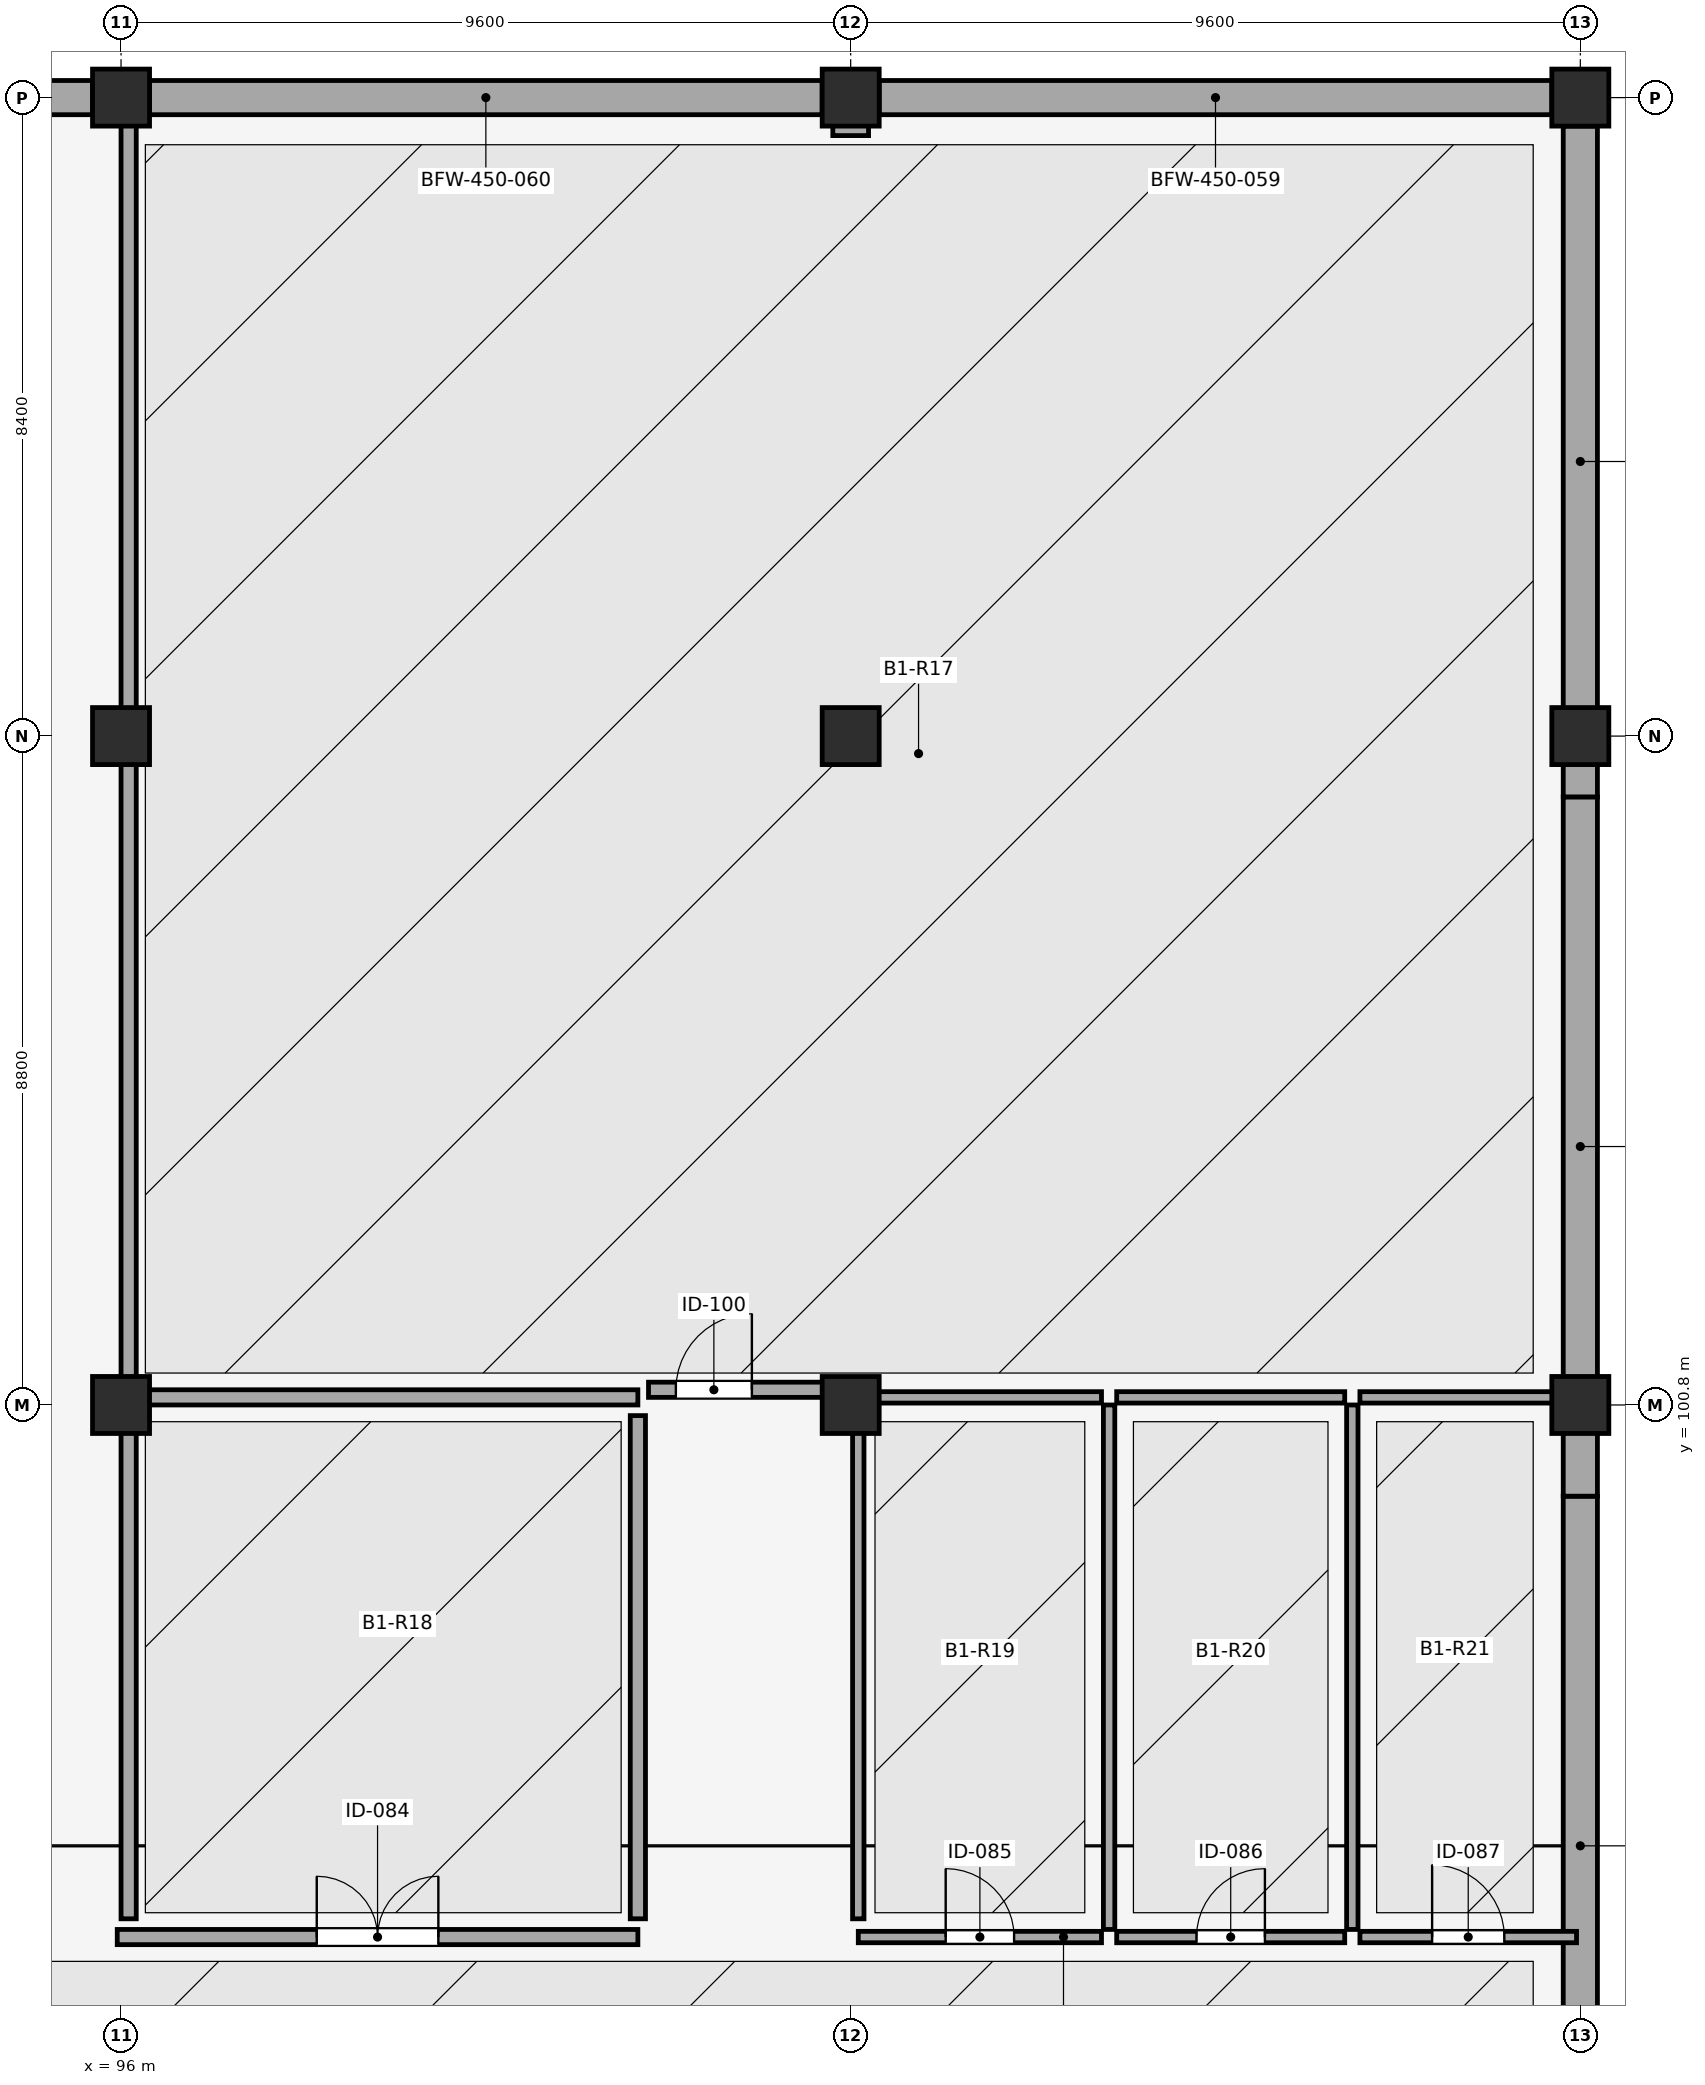
"""IFC4 building model, lengths in metres.
Left out: names, types, materials, properties, quantities, classifications, styles, units other than length and angle.
Written with IfcOpenShell. Run it as: python <this file> out.ifc"""

import sys

from ifc_helpers import new_model, si_unit, direction, frame, frame_2d, origin, origin_2d, place, context, subcontext, project, spatial, rectangle, extrude, element, fill, save


model = new_model("IFC4")
c1 = context("Model", 3, precision=1e-05, world=origin(), true_north=direction((0.0, 1.0)))
c2 = subcontext(c1, "Body", "Model", "MODEL_VIEW")
j1 = project(units=[si_unit("LENGTHUNIT", "METRE"), si_unit("PLANEANGLEUNIT", "RADIAN")], contexts=[c1])
p1 = place(None, origin())
s1 = spatial("IfcSite", under=j1, at=p1, CompositionType="ELEMENT")
p2 = place(p1, origin())
s2 = spatial("IfcBuilding", under=s1, at=p2, CompositionType="ELEMENT")
p3 = place(p2, frame((0.0, 0.0, -4.2)))
s3 = spatial("IfcBuildingStorey", under=s2, at=p3, CompositionType="ELEMENT", Elevation=-4.2)
for number, where, z_axis, x_axis in (
    (1, (96.0, 100.8, 0.0), (0.0, 0.0, 1.0), (1.0, 0.0, 0.0)),
    (2, (96.0, 109.6, 0.0), (0.0, 0.0, 1.0), (1.0, 0.0, 0.0)),
    (3, (96.0, 118.0, 0.0), (0.0, 0.0, 1.0), (1.0, 0.0, 0.0)),
    (4, (105.6, 100.8, 0.0), (0.0, 0.0, 1.0), (1.0, 0.0, 0.0)),
    (5, (105.6, 109.6, 0.0), (0.0, 0.0, 1.0), (1.0, 0.0, 0.0)),
    (6, (105.6, 118.0, 0.0), (0.0, 0.0, 1.0), (1.0, 0.0, 0.0)),
    (7, (115.2, 100.8, 0.0), (0.0, 0.0, 1.0), (1.0, 0.0, 0.0)),
    (8, (115.2, 109.6, 0.0), (0.0, 0.0, 1.0), (1.0, 0.0, 0.0)),
    (9, (115.2, 118.0, 0.0), (0.0, 0.0, 1.0), (1.0, 0.0, 0.0)),
):
    element("IfcColumn", number, at=place(p3, frame(where, z_axis=z_axis, x_axis=x_axis)), inside=s3, PredefinedType="COLUMN", context=c2, shape_type="SweptSolid", body=[
        extrude(rectangle(XDim=0.75, YDim=0.75, at=origin_2d()), origin(), (0.0, 0.0, 1.0), 4.2),
    ])
p4 = place(p3, frame((115.2, 90.4, 0.0), z_axis=(0.0, 0.0, 1.0), x_axis=(0.0, 1.0, 0.0)))
e10 = element("IfcWall", 10, at=p4, inside=s3, PredefinedType="SOLIDWALL", context=c2, shape_type="SweptSolid", body=[
    extrude(rectangle(XDim=9.2, YDim=0.45, at=frame_2d((4.6, 0.0))), origin(), (0.0, 0.0, 1.0), 3.84),
])
p5 = place(p3, frame((115.2, 99.6, 0.0), z_axis=(0.0, 0.0, 1.0), x_axis=(0.0, 1.0, 0.0)))
e11 = element("IfcWall", 11, at=p5, inside=s3, PredefinedType="SOLIDWALL", context=c2, shape_type="SweptSolid", body=[
    extrude(rectangle(XDim=9.2, YDim=0.45, at=frame_2d((4.6, 0.0))), origin(), (0.0, 0.0, 1.0), 3.84),
])
p6 = place(p3, frame((115.2, 108.8, 0.0), z_axis=(0.0, 0.0, 1.0), x_axis=(0.0, 1.0, 0.0)))
e12 = element("IfcWall", 12, at=p6, inside=s3, PredefinedType="SOLIDWALL", context=c2, shape_type="SweptSolid", body=[
    extrude(rectangle(XDim=8.825, YDim=0.45, at=frame_2d((4.413, 0.0))), origin(), (0.0, 0.0, 1.0), 3.84),
])
p7 = place(p3, frame((114.825, 118.0, 0.0), z_axis=(0.0, 0.0, 1.0), x_axis=(-1.0, 0.0, 0.0)))
e13 = element("IfcWall", 13, at=p7, inside=s3, PredefinedType="SOLIDWALL", context=c2, shape_type="SweptSolid", body=[
    extrude(rectangle(XDim=8.85, YDim=0.45, at=frame_2d((4.425, 0.0))), origin(), (0.0, 0.0, 1.0), 3.84),
])
for number, where, z_axis, x_axis in (
    (14, (105.225, 118.0, 0.0), (0.0, 0.0, 1.0), (-1.0, 0.0, 0.0)),
    (15, (95.625, 118.0, 0.0), (0.0, 0.0, 1.0), (-1.0, 0.0, 0.0)),
):
    element("IfcWall", number, at=place(p3, frame(where, z_axis=z_axis, x_axis=x_axis)), inside=s3, PredefinedType="SOLIDWALL", context=c2, shape_type="SweptSolid", body=[
        extrude(rectangle(XDim=8.85, YDim=0.45, at=frame_2d((4.425, 0.0))), origin(), (0.0, 0.0, 1.0), 3.84),
    ])
p8 = place(p3, frame((95.95, 93.8, 0.0), z_axis=(0.0, 0.0, 1.0), x_axis=(1.0, 0.0, 0.0)))
e16 = element("IfcWall", 16, at=p8, inside=s3, PredefinedType="PARTITIONING", context=c2, shape_type="SweptSolid", body=[
    extrude(rectangle(XDim=6.85, YDim=0.2, at=frame_2d((3.425, 0.0))), origin(), (0.0, 0.0, 1.0), 3.84),
])
p9 = place(p8, frame((2.625, 0.0, 0.0)))
e17 = element("IfcOpeningElement", 17, at=p9, cuts=e16, PredefinedType="OPENING", context=c2, shape_type="SweptSolid", body=[
    extrude(rectangle(XDim=1.6, YDim=2.2, at=frame_2d((0.8, 1.1))), frame((0.0, 0.11, 0.0), z_axis=(0.0, -1.0, 0.0), x_axis=(1.0, 0.0, 0.0)), (0.0, 0.0, 1.0), 0.22),
])
p10 = place(p3, frame((105.7, 93.8, 0.0), z_axis=(0.0, 0.0, 1.0), x_axis=(1.0, 0.0, 0.0)))
e18 = element("IfcWall", 18, at=p10, inside=s3, PredefinedType="PARTITIONING", context=c2, shape_type="SweptSolid", body=[
    extrude(rectangle(XDim=3.2, YDim=0.15, at=frame_2d((1.6, 0.0))), origin(), (0.0, 0.0, 1.0), 3.84),
])
p11 = place(p10, frame((1.15, 0.0, 0.0)))
e19 = element("IfcOpeningElement", 19, at=p11, cuts=e18, PredefinedType="OPENING", context=c2, shape_type="SweptSolid", body=[
    extrude(rectangle(XDim=0.9, YDim=2.15, at=frame_2d((0.45, 1.075))), frame((0.0, 0.085, 0.0), z_axis=(0.0, -1.0, 0.0), x_axis=(1.0, 0.0, 0.0)), (0.0, 0.0, 1.0), 0.17),
])
p12 = place(p3, frame((109.1, 93.8, 0.0), z_axis=(0.0, 0.0, 1.0), x_axis=(1.0, 0.0, 0.0)))
e20 = element("IfcWall", 20, at=p12, inside=s3, PredefinedType="PARTITIONING", context=c2, shape_type="SweptSolid", body=[
    extrude(rectangle(XDim=3.0, YDim=0.15, at=frame_2d((1.5, 0.0))), origin(), (0.0, 0.0, 1.0), 3.84),
])
p13 = place(p12, frame((1.05, 0.0, 0.0)))
e21 = element("IfcOpeningElement", 21, at=p13, cuts=e20, PredefinedType="OPENING", context=c2, shape_type="SweptSolid", body=[
    extrude(rectangle(XDim=0.9, YDim=2.15, at=frame_2d((0.45, 1.075))), frame((0.0, 0.085, 0.0), z_axis=(0.0, -1.0, 0.0), x_axis=(1.0, 0.0, 0.0)), (0.0, 0.0, 1.0), 0.17),
])
p14 = place(p3, frame((112.3, 93.8, 0.0), z_axis=(0.0, 0.0, 1.0), x_axis=(1.0, 0.0, 0.0)))
e22 = element("IfcWall", 22, at=p14, inside=s3, PredefinedType="PARTITIONING", context=c2, shape_type="SweptSolid", body=[
    extrude(rectangle(XDim=2.85, YDim=0.15, at=frame_2d((1.425, 0.0))), origin(), (0.0, 0.0, 1.0), 3.84),
])
p15 = place(p14, frame((0.95, 0.0, 0.0)))
e23 = element("IfcOpeningElement", 23, at=p15, cuts=e22, PredefinedType="OPENING", context=c2, shape_type="SweptSolid", body=[
    extrude(rectangle(XDim=0.95, YDim=2.15, at=frame_2d((0.475, 1.075))), frame((0.0, 0.085, 0.0), z_axis=(0.0, -1.0, 0.0), x_axis=(1.0, 0.0, 0.0)), (0.0, 0.0, 1.0), 0.17),
])
p16 = place(p3, frame((95.95, 100.9, 0.0), z_axis=(0.0, 0.0, 1.0), x_axis=(1.0, 0.0, 0.0)))
e24 = element("IfcWall", 24, at=p16, inside=s3, PredefinedType="PARTITIONING", context=c2, shape_type="SweptSolid", body=[
    extrude(rectangle(XDim=6.85, YDim=0.2, at=frame_2d((3.425, 0.0))), origin(), (0.0, 0.0, 1.0), 3.292),
])
p17 = place(p3, frame((105.7, 100.9, 0.0), z_axis=(0.0, 0.0, 1.0), x_axis=(1.0, 0.0, 0.0)))
e25 = element("IfcWall", 25, at=p17, inside=s3, PredefinedType="PARTITIONING", context=c2, shape_type="SweptSolid", body=[
    extrude(rectangle(XDim=3.2, YDim=0.15, at=frame_2d((1.6, 0.0))), origin(), (0.0, 0.0, 1.0), 3.292),
])
p18 = place(p3, frame((109.1, 100.9, 0.0), z_axis=(0.0, 0.0, 1.0), x_axis=(1.0, 0.0, 0.0)))
e26 = element("IfcWall", 26, at=p18, inside=s3, PredefinedType="PARTITIONING", context=c2, shape_type="SweptSolid", body=[
    extrude(rectangle(XDim=3.0, YDim=0.15, at=frame_2d((1.5, 0.0))), origin(), (0.0, 0.0, 1.0), 3.292),
])
p19 = place(p3, frame((112.3, 100.9, 0.0), z_axis=(0.0, 0.0, 1.0), x_axis=(1.0, 0.0, 0.0)))
e27 = element("IfcWall", 27, at=p19, inside=s3, PredefinedType="PARTITIONING", context=c2, shape_type="SweptSolid", body=[
    extrude(rectangle(XDim=2.85, YDim=0.15, at=frame_2d((1.425, 0.0))), origin(), (0.0, 0.0, 1.0), 3.292),
])
for number, where, z_axis, x_axis in (
    (28, (109.0, 93.9, 0.0), (0.0, 0.0, 1.0), (0.0, 1.0, 0.0)),
    (29, (112.2, 93.9, 0.0), (0.0, 0.0, 1.0), (0.0, 1.0, 0.0)),
):
    element("IfcWall", number, at=place(p3, frame(where, z_axis=z_axis, x_axis=x_axis)), inside=s3, PredefinedType="PARTITIONING", context=c2, shape_type="SweptSolid", body=[
        extrude(rectangle(XDim=6.9, YDim=0.15, at=frame_2d((3.45, 0.0))), origin(), (0.0, 0.0, 1.0), 3.84),
    ])
p20 = place(p3, frame((102.94, 101.0, 0.0), z_axis=(0.0, 0.0, 1.0), x_axis=(1.0, 0.0, 0.0)))
e30 = element("IfcWall", 30, at=p20, inside=s3, PredefinedType="PARTITIONING", context=c2, shape_type="SweptSolid", body=[
    extrude(rectangle(XDim=2.62, YDim=0.2, at=frame_2d((1.31, 0.0))), origin(), (0.0, 0.0, 1.0), 3.292),
])
p21 = place(p20, frame((0.36, 0.0, 0.0)))
e31 = element("IfcOpeningElement", 31, at=p21, cuts=e30, PredefinedType="OPENING", context=c2, shape_type="SweptSolid", body=[
    extrude(rectangle(XDim=1.0, YDim=2.15, at=frame_2d((0.5, 1.075))), frame((0.0, 0.11, 0.0), z_axis=(0.0, -1.0, 0.0), x_axis=(1.0, 0.0, 0.0)), (0.0, 0.0, 1.0), 0.22),
])
p22 = place(p3, frame((105.365, 117.6, 0.0), z_axis=(0.0, 0.0, 1.0), x_axis=(1.0, 0.0, 0.0)))
e32 = element("IfcWall", 32, at=p22, inside=s3, PredefinedType="PARTITIONING", context=c2, shape_type="SweptSolid", body=[
    extrude(rectangle(XDim=0.47, YDim=0.2, at=frame_2d((0.235, 0.0))), origin(), (0.0, 0.0, 1.0), 3.84),
])
p23 = place(p3, frame((96.1, 101.14, 0.0), z_axis=(0.0, 0.0, 1.0), x_axis=(0.0, 1.0, 0.0)))
e33 = element("IfcWall", 33, at=p23, inside=s3, PredefinedType="PARTITIONING", context=c2, shape_type="SweptSolid", body=[
    extrude(rectangle(XDim=16.81, YDim=0.2, at=frame_2d((8.405, 0.0))), origin(), (0.0, 0.0, 1.0), 3.295),
])
p24 = place(p3, frame((96.1, 94.04, 0.0), z_axis=(0.0, 0.0, 1.0), x_axis=(0.0, 1.0, 0.0)))
e34 = element("IfcWall", 34, at=p24, inside=s3, PredefinedType="PARTITIONING", context=c2, shape_type="SweptSolid", body=[
    extrude(rectangle(XDim=6.62, YDim=0.2, at=frame_2d((3.31, 0.0))), origin(), (0.0, 0.0, 1.0), 3.295),
])
p25 = place(p3, frame((102.8, 94.04, 0.0), z_axis=(0.0, 0.0, 1.0), x_axis=(0.0, 1.0, 0.0)))
e35 = element("IfcWall", 35, at=p25, inside=s3, PredefinedType="PARTITIONING", context=c2, shape_type="SweptSolid", body=[
    extrude(rectangle(XDim=6.62, YDim=0.2, at=frame_2d((3.31, 0.0))), origin(), (0.0, 0.0, 1.0), 3.84),
])
p26 = place(p3, frame((105.7, 94.04, 0.0), z_axis=(0.0, 0.0, 1.0), x_axis=(0.0, 1.0, 0.0)))
e36 = element("IfcWall", 36, at=p26, inside=s3, PredefinedType="PARTITIONING", context=c2, shape_type="SweptSolid", body=[
    extrude(rectangle(XDim=6.62, YDim=0.15, at=frame_2d((3.31, 0.0))), origin(), (0.0, 0.0, 1.0), 3.295),
])
p27 = place(p9, origin())
e37 = element("IfcDoor", 37, at=p27, inside=s3, OperationType="DOUBLE_DOOR_SINGLE_SWING", PredefinedType="DOOR", context=c2, shape_type="SweptSolid", body=[
    extrude(rectangle(XDim=1.6, YDim=2.2, at=frame_2d((0.8, 1.1))), frame((0.0, 0.025, 0.0), z_axis=(0.0, -1.0, 0.0), x_axis=(1.0, 0.0, 0.0)), (0.0, 0.0, 1.0), 0.05),
])
fill(e17, e37)
p28 = place(p11, origin())
e38 = element("IfcDoor", 38, at=p28, inside=s3, OperationType="SINGLE_SWING_LEFT", PredefinedType="DOOR", context=c2, shape_type="SweptSolid", body=[
    extrude(rectangle(XDim=0.9, YDim=2.15, at=frame_2d((0.45, 1.075))), frame((0.0, 0.025, 0.0), z_axis=(0.0, -1.0, 0.0), x_axis=(1.0, 0.0, 0.0)), (0.0, 0.0, 1.0), 0.05),
])
fill(e19, e38)
p29 = place(p13, origin())
e39 = element("IfcDoor", 39, at=p29, inside=s3, OperationType="SINGLE_SWING_RIGHT", PredefinedType="DOOR", context=c2, shape_type="SweptSolid", body=[
    extrude(rectangle(XDim=0.9, YDim=2.15, at=frame_2d((0.45, 1.075))), frame((0.0, 0.025, 0.0), z_axis=(0.0, -1.0, 0.0), x_axis=(1.0, 0.0, 0.0)), (0.0, 0.0, 1.0), 0.05),
])
fill(e21, e39)
p30 = place(p15, origin())
e40 = element("IfcDoor", 40, at=p30, inside=s3, OperationType="SINGLE_SWING_LEFT", PredefinedType="DOOR", context=c2, shape_type="SweptSolid", body=[
    extrude(rectangle(XDim=0.95, YDim=2.15, at=frame_2d((0.475, 1.075))), frame((0.0, 0.025, 0.0), z_axis=(0.0, -1.0, 0.0), x_axis=(1.0, 0.0, 0.0)), (0.0, 0.0, 1.0), 0.05),
])
fill(e23, e40)
p31 = place(p21, origin())
e41 = element("IfcDoor", 41, at=p31, inside=s3, OperationType="SINGLE_SWING_RIGHT", PredefinedType="DOOR", context=c2, shape_type="SweptSolid", body=[
    extrude(rectangle(XDim=1.0, YDim=2.15, at=frame_2d((0.5, 1.075))), frame((0.0, 0.025, 0.0), z_axis=(0.0, -1.0, 0.0), x_axis=(1.0, 0.0, 0.0)), (0.0, 0.0, 1.0), 0.05),
])
fill(e31, e41)
save(model, sys.argv[1])
